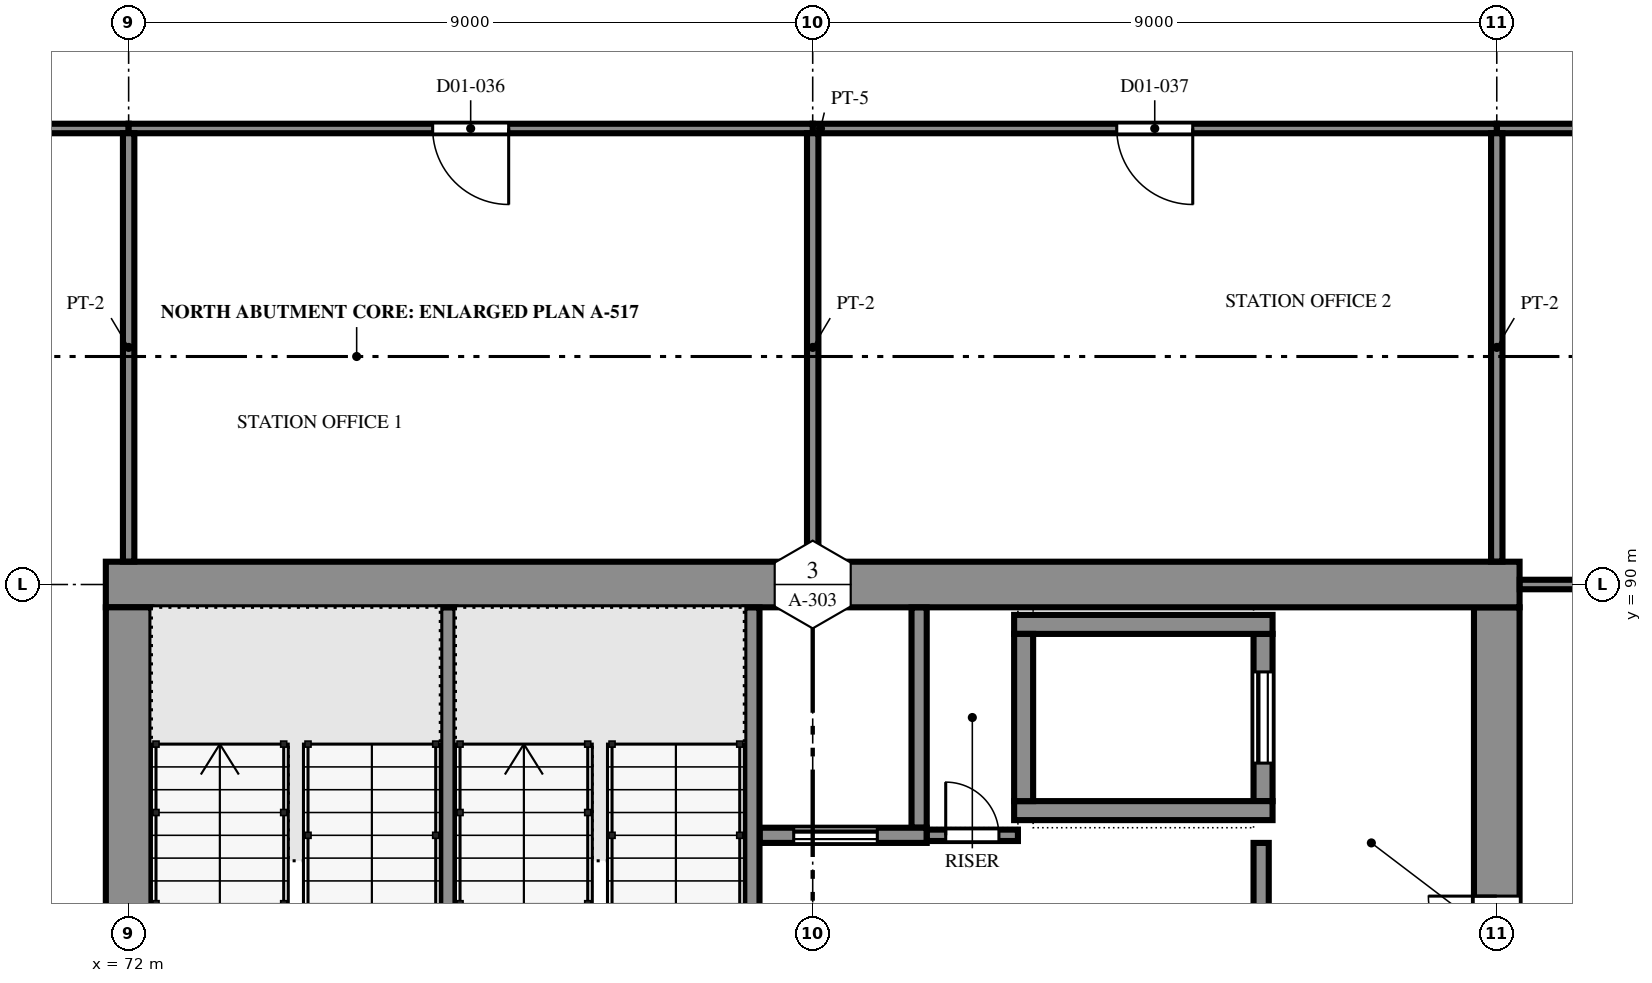
"""IFC4 building model, lengths in metres.
Left out: names, types, materials, properties, quantities, classifications, styles, units other than length and angle.
Written with IfcOpenShell. Run it as: python <this file> out.ifc"""

import sys

from ifc_helpers import new_model, si_unit, direction, frame, frame_2d, origin, place, context, subcontext, project, spatial, polyline, rectangle, outline, extrude, element, fill, save


model = new_model("IFC4")
c1 = context("Model", 3, precision=1e-05, world=origin(), true_north=direction((0.0, 1.0)))
c2 = subcontext(c1, "Body", "Model", "MODEL_VIEW")
j1 = project(units=[si_unit("LENGTHUNIT", "METRE"), si_unit("PLANEANGLEUNIT", "RADIAN")], contexts=[c1])
p1 = place(None, origin())
s1 = spatial("IfcSite", under=j1, at=p1, CompositionType="ELEMENT")
p2 = place(p1, origin())
s2 = spatial("IfcBuilding", under=s1, at=p2, CompositionType="ELEMENT")
p3 = place(p2, frame((0.0, 0.0, 7.5)))
s3 = spatial("IfcBuildingStorey", under=s2, at=p3, CompositionType="ELEMENT", Elevation=7.5)
p4 = place(p3, frame((71.7, 90.0, 0.0), z_axis=(0.0, 0.0, 1.0), x_axis=(1.0, 0.0, 0.0)))
e1 = element("IfcWall", 1, at=p4, inside=s3, PredefinedType="SOLIDWALL", context=c2, shape_type="SweptSolid", body=[
    extrude(rectangle(XDim=18.6, YDim=0.6, at=frame_2d((9.3, 0.0))), origin(), (0.0, 0.0, 1.0), 4.2),
])
p5 = place(p3, frame((72.0, 81.3, 0.0), z_axis=(0.0, 0.0, 1.0), x_axis=(0.0, 1.0, 0.0)))
e2 = element("IfcWall", 2, at=p5, inside=s3, PredefinedType="SOLIDWALL", context=c2, shape_type="SweptSolid", body=[
    extrude(rectangle(XDim=8.4, YDim=0.6, at=frame_2d((4.2, 0.0))), origin(), (0.0, 0.0, 1.0), 4.2),
])
p6 = place(p3, frame((90.0, 81.3, 0.0), z_axis=(0.0, 0.0, 1.0), x_axis=(0.0, 1.0, 0.0)))
e3 = element("IfcWall", 3, at=p6, inside=s3, PredefinedType="SOLIDWALL", context=c2, shape_type="SweptSolid", body=[
    extrude(rectangle(XDim=8.4, YDim=0.6, at=frame_2d((4.2, 0.0))), origin(), (0.0, 0.0, 1.0), 4.2),
])
p7 = place(p6, frame((2.8, 0.0, 0.0)))
e4 = element("IfcOpeningElement", 4, at=p7, cuts=e3, PredefinedType="OPENING", context=c2, shape_type="SweptSolid", body=[
    extrude(rectangle(XDim=1.8, YDim=2.1, at=frame_2d((0.9, 1.05))), frame((0.0, 0.31, 0.0), z_axis=(0.0, -1.0, 0.0), x_axis=(1.0, 0.0, 0.0)), (0.0, 0.0, 1.0), 0.62),
])
p8 = place(p6, frame((0.55, 0.0, 0.0)))
e5 = element("IfcOpeningElement", 5, at=p8, cuts=e3, PredefinedType="OPENING", context=c2, shape_type="SweptSolid", body=[
    extrude(rectangle(XDim=0.9, YDim=2.1, at=frame_2d((0.45, 1.05))), frame((0.0, 0.31, 0.0), z_axis=(0.0, -1.0, 0.0), x_axis=(1.0, 0.0, 0.0)), (0.0, 0.0, 1.0), 0.62),
])
for number, where, z_axis, x_axis in (
    (6, (76.2, 81.302, -0.13), (0.0, 0.0, 1.0), (0.0, 1.0, 0.0)),
    (7, (80.2, 81.302, -0.13), (0.0, 0.0, 1.0), (0.0, 1.0, 0.0)),
):
    element("IfcWall", number, at=place(p3, frame(where, z_axis=z_axis, x_axis=x_axis)), inside=s3, PredefinedType="SOLIDWALL", context=c2, shape_type="SweptSolid", body=[
        extrude(rectangle(XDim=8.396, YDim=0.2, at=frame_2d((4.198, 0.0))), origin(), (0.0, 0.0, 1.0), 3.646),
    ])
p9 = place(p3, frame((80.302, 86.7, 0.0), z_axis=(0.0, 0.0, 1.0), x_axis=(1.0, 0.0, 0.0)))
e8 = element("IfcWall", 8, at=p9, inside=s3, PredefinedType="SOLIDWALL", context=c2, shape_type="SweptSolid", body=[
    extrude(rectangle(XDim=2.198, YDim=0.2, at=frame_2d((1.099, 0.0))), origin(), (0.0, 0.0, 1.0), 3.516),
])
p10 = place(p9, frame((0.448, 0.0, 0.0)))
e9 = element("IfcOpeningElement", 9, at=p10, cuts=e8, PredefinedType="OPENING", context=c2, shape_type="SweptSolid", body=[
    extrude(rectangle(XDim=1.1, YDim=2.1, at=frame_2d((0.55, 1.05))), frame((0.0, 0.11, 0.0), z_axis=(0.0, -1.0, 0.0), x_axis=(1.0, 0.0, 0.0)), (0.0, 0.0, 1.0), 0.22),
])
p11 = place(p3, frame((82.4, 86.8, 0.0), z_axis=(0.0, 0.0, 1.0), x_axis=(0.0, 1.0, 0.0)))
e10 = element("IfcWall", 10, at=p11, inside=s3, PredefinedType="SOLIDWALL", context=c2, shape_type="SweptSolid", body=[
    extrude(rectangle(XDim=2.898, YDim=0.2, at=frame_2d((1.449, 0.0))), origin(), (0.0, 0.0, 1.0), 3.516),
])
for number, where, z_axis, x_axis in (
    (11, (83.65, 87.025, 0.0), (0.0, 0.0, 1.0), (1.0, 0.0, 0.0)),
    (12, (83.65, 89.475, 0.0), (0.0, 0.0, 1.0), (1.0, 0.0, 0.0)),
):
    element("IfcWall", number, at=place(p3, frame(where, z_axis=z_axis, x_axis=x_axis)), inside=s3, PredefinedType="SOLIDWALL", context=c2, shape_type="SweptSolid", body=[
        extrude(rectangle(XDim=3.4, YDim=0.25, at=frame_2d((1.7, 0.0))), origin(), (0.0, 0.0, 1.0), 3.516),
    ])
p12 = place(p3, frame((83.775, 87.15, 0.0), z_axis=(0.0, 0.0, 1.0), x_axis=(0.0, 1.0, 0.0)))
e13 = element("IfcWall", 13, at=p12, inside=s3, PredefinedType="SOLIDWALL", context=c2, shape_type="SweptSolid", body=[
    extrude(rectangle(XDim=2.2, YDim=0.25, at=frame_2d((1.1, 0.0))), origin(), (0.0, 0.0, 1.0), 3.516),
])
p13 = place(p3, frame((86.925, 87.15, 0.0), z_axis=(0.0, 0.0, 1.0), x_axis=(0.0, 1.0, 0.0)))
e14 = element("IfcWall", 14, at=p13, inside=s3, PredefinedType="SOLIDWALL", context=c2, shape_type="SweptSolid", body=[
    extrude(rectangle(XDim=2.2, YDim=0.25, at=frame_2d((1.1, 0.0))), origin(), (0.0, 0.0, 1.0), 3.516),
])
p14 = place(p13, frame((0.5, 0.0, 0.0)))
e15 = element("IfcOpeningElement", 15, at=p14, cuts=e14, PredefinedType="OPENING", context=c2, shape_type="SweptSolid", body=[
    extrude(rectangle(XDim=1.2, YDim=2.1, at=frame_2d((0.6, 1.05))), frame((0.0, 0.135, 0.0), z_axis=(0.0, -1.0, 0.0), x_axis=(1.0, 0.0, 0.0)), (0.0, 0.0, 1.0), 0.27),
])
p15 = place(p3, frame((99.062, 96.0, 0.0), z_axis=(0.0, 0.0, 1.0), x_axis=(-1.0, 0.0, 0.0)))
e16 = element("IfcWall", 16, at=p15, inside=s3, PredefinedType="PARTITIONING", context=c2, shape_type="SweptSolid", body=[
    extrude(rectangle(XDim=9.062, YDim=0.125, at=frame_2d((4.531, 0.0))), origin(), (0.0, 0.0, 1.0), 3.307),
])
p16 = place(p3, frame((72.0, 96.0, 0.0), z_axis=(0.0, 0.0, 1.0), x_axis=(-1.0, 0.0, 0.0)))
e17 = element("IfcWall", 17, at=p16, inside=s3, PredefinedType="PARTITIONING", context=c2, shape_type="SweptSolid", body=[
    extrude(rectangle(XDim=8.858, YDim=0.125, at=frame_2d((4.429, 0.0))), origin(), (0.0, 0.0, 1.0), 3.307),
])
p17 = place(p16, frame((4.0, 0.0, 0.0)))
e18 = element("IfcOpeningElement", 18, at=p17, cuts=e17, PredefinedType="OPENING", context=c2, shape_type="SweptSolid", body=[
    extrude(rectangle(XDim=1.0, YDim=2.1, at=frame_2d((0.5, 1.05))), frame((0.0, 0.073, 0.0), z_axis=(0.0, -1.0, 0.0), x_axis=(1.0, 0.0, 0.0)), (0.0, 0.0, 1.0), 0.145),
])
p18 = place(p3, frame((90.0, 96.0, 0.0), z_axis=(0.0, 0.0, 1.0), x_axis=(-1.0, 0.0, 0.0)))
e19 = element("IfcWall", 19, at=p18, inside=s3, PredefinedType="PARTITIONING", context=c2, shape_type="SweptSolid", body=[
    extrude(rectangle(XDim=9.0, YDim=0.125, at=frame_2d((4.5, 0.0))), origin(), (0.0, 0.0, 1.0), 3.307),
])
p19 = place(p18, frame((4.0, 0.0, 0.0)))
e20 = element("IfcOpeningElement", 20, at=p19, cuts=e19, PredefinedType="OPENING", context=c2, shape_type="SweptSolid", body=[
    extrude(rectangle(XDim=1.0, YDim=2.1, at=frame_2d((0.5, 1.05))), frame((0.0, 0.073, 0.0), z_axis=(0.0, -1.0, 0.0), x_axis=(1.0, 0.0, 0.0)), (0.0, 0.0, 1.0), 0.145),
])
p20 = place(p3, frame((81.0, 96.0, 0.0), z_axis=(0.0, 0.0, 1.0), x_axis=(-1.0, 0.0, 0.0)))
e21 = element("IfcWall", 21, at=p20, inside=s3, PredefinedType="PARTITIONING", context=c2, shape_type="SweptSolid", body=[
    extrude(rectangle(XDim=9.0, YDim=0.125, at=frame_2d((4.5, 0.0))), origin(), (0.0, 0.0, 1.0), 3.307),
])
p21 = place(p20, frame((4.0, 0.0, 0.0)))
e22 = element("IfcOpeningElement", 22, at=p21, cuts=e21, PredefinedType="OPENING", context=c2, shape_type="SweptSolid", body=[
    extrude(rectangle(XDim=1.0, YDim=2.1, at=frame_2d((0.5, 1.05))), frame((0.0, 0.073, 0.0), z_axis=(0.0, -1.0, 0.0), x_axis=(1.0, 0.0, 0.0)), (0.0, 0.0, 1.0), 0.145),
])
p22 = place(p3, frame((90.302, 90.0, 0.0), z_axis=(0.0, 0.0, 1.0), x_axis=(1.0, 0.0, 0.0)))
e23 = element("IfcWall", 23, at=p22, inside=s3, PredefinedType="PARTITIONING", context=c2, shape_type="SweptSolid", body=[
    extrude(rectangle(XDim=8.544, YDim=0.125, at=frame_2d((4.272, 0.0))), origin(), (0.0, 0.0, 1.0), 3.307),
])
p23 = place(p22, frame((3.598, 0.0, 0.0)))
e24 = element("IfcOpeningElement", 24, at=p23, cuts=e23, PredefinedType="OPENING", context=c2, shape_type="SweptSolid", body=[
    extrude(rectangle(XDim=1.2, YDim=2.1, at=frame_2d((0.6, 1.05))), frame((0.0, 0.073, 0.0), z_axis=(0.0, -1.0, 0.0), x_axis=(1.0, 0.0, 0.0)), (0.0, 0.0, 1.0), 0.145),
])
for number, where, z_axis, x_axis in (
    (25, (72.0, 95.938, 0.0), (0.0, 0.0, 1.0), (0.0, -1.0, 0.0)),
    (26, (81.0, 95.938, 0.0), (0.0, 0.0, 1.0), (0.0, -1.0, 0.0)),
    (27, (90.0, 95.938, 0.0), (0.0, 0.0, 1.0), (0.0, -1.0, 0.0)),
):
    element("IfcWall", number, at=place(p3, frame(where, z_axis=z_axis, x_axis=x_axis)), inside=s3, PredefinedType="PARTITIONING", context=c2, shape_type="SweptSolid", body=[
        extrude(rectangle(XDim=5.635, YDim=0.15, at=frame_2d((2.818, 0.0))), origin(), (0.0, 0.0, 1.0), 3.307),
    ])
p24 = place(p3, frame((86.9, 86.6, 0.0), z_axis=(0.0, 0.0, 1.0), x_axis=(0.0, -1.0, 0.0)))
e28 = element("IfcWall", 28, at=p24, inside=s3, PredefinedType="PARTITIONING", context=c2, shape_type="SweptSolid", body=[
    extrude(rectangle(XDim=3.1, YDim=0.2, at=frame_2d((1.55, 0.0))), origin(), (0.0, 0.0, 1.0), 3.382),
])
p25 = place(p24, frame((1.0, 0.0, 0.0)))
e29 = element("IfcOpeningElement", 29, at=p25, cuts=e28, PredefinedType="OPENING", context=c2, shape_type="SweptSolid", body=[
    extrude(rectangle(XDim=1.2, YDim=2.1, at=frame_2d((0.6, 1.05))), frame((0.0, 0.11, 0.0), z_axis=(0.0, -1.0, 0.0), x_axis=(1.0, 0.0, 0.0)), (0.0, 0.0, 1.0), 0.22),
])
p26 = place(p3, frame((82.502, 86.7, 0.0), z_axis=(0.0, 0.0, 1.0), x_axis=(1.0, 0.0, 0.0)))
e30 = element("IfcWall", 30, at=p26, inside=s3, PredefinedType="SOLIDWALL", context=c2, shape_type="SweptSolid", body=[
    extrude(rectangle(XDim=1.198, YDim=0.15, at=frame_2d((0.599, 0.0))), origin(), (0.0, 0.0, 1.0), 3.516),
])
p27 = place(p26, frame((0.248, 0.0, 0.0)))
e31 = element("IfcOpeningElement", 31, at=p27, cuts=e30, PredefinedType="OPENING", context=c2, shape_type="SweptSolid", body=[
    extrude(rectangle(XDim=0.7, YDim=2.0, at=frame_2d((0.35, 1.0))), frame((0.0, 0.085, 0.0), z_axis=(0.0, -1.0, 0.0), x_axis=(1.0, 0.0, 0.0)), (0.0, 0.0, 1.0), 0.17),
])
p28 = place(p10, origin())
e32 = element("IfcDoor", 32, at=p28, inside=s3, OperationType="SLIDING_TO_LEFT", PredefinedType="DOOR", context=c2, shape_type="SweptSolid", body=[
    extrude(outline(polyline([(0.0, 0.0), (0.07, 0.0), (0.07, 2.03), (1.03, 2.03), (1.03, 0.0), (1.1, 0.0), (1.1, 2.1), (0.0, 2.1), (0.0, 0.0)])), frame((0.0, 0.025, 0.0), z_axis=(0.0, -1.0, 0.0), x_axis=(1.0, 0.0, 0.0)), (0.0, 0.0, 1.0), 0.05),
    extrude(rectangle(XDim=0.524, YDim=2.016, at=frame_2d((0.336, 1.018))), frame((0.0, 0.018, 0.0), z_axis=(0.0, -1.0, 0.0), x_axis=(1.0, 0.0, 0.0)), (0.0, 0.0, 1.0), 0.016),
    extrude(rectangle(XDim=0.52, YDim=2.016, at=frame_2d((0.766, 1.018))), frame((0.0, -0.002, 0.0), z_axis=(0.0, -1.0, 0.0), x_axis=(1.0, 0.0, 0.0)), (0.0, 0.0, 1.0), 0.016),
])
fill(e9, e32)
p29 = place(p14, origin())
e33 = element("IfcDoor", 33, at=p29, inside=s3, OperationType="SLIDING_TO_LEFT", PredefinedType="DOOR", context=c2, shape_type="SweptSolid", body=[
    extrude(outline(polyline([(0.0, 0.0), (0.07, 0.0), (0.07, 2.03), (1.13, 2.03), (1.13, 0.0), (1.2, 0.0), (1.2, 2.1), (0.0, 2.1), (0.0, 0.0)])), frame((0.0, 0.025, 0.0), z_axis=(0.0, -1.0, 0.0), x_axis=(1.0, 0.0, 0.0)), (0.0, 0.0, 1.0), 0.05),
    extrude(rectangle(XDim=0.579, YDim=2.016, at=frame_2d((0.363, 1.018))), frame((0.0, 0.018, 0.0), z_axis=(0.0, -1.0, 0.0), x_axis=(1.0, 0.0, 0.0)), (0.0, 0.0, 1.0), 0.016),
    extrude(rectangle(XDim=0.575, YDim=2.016, at=frame_2d((0.839, 1.018))), frame((0.0, -0.002, 0.0), z_axis=(0.0, -1.0, 0.0), x_axis=(1.0, 0.0, 0.0)), (0.0, 0.0, 1.0), 0.016),
])
fill(e15, e33)
p30 = place(p21, origin())
e34 = element("IfcDoor", 34, at=p30, inside=s3, OperationType="SINGLE_SWING_LEFT", PredefinedType="DOOR", context=c2, shape_type="SweptSolid", body=[
    extrude(outline(polyline([(0.0, 0.0), (0.07, 0.0), (0.07, 2.03), (0.93, 2.03), (0.93, 0.0), (1.0, 0.0), (1.0, 2.1), (0.0, 2.1), (0.0, 0.0)])), frame((0.0, 0.025, 0.0), z_axis=(0.0, -1.0, 0.0), x_axis=(1.0, 0.0, 0.0)), (0.0, 0.0, 1.0), 0.05),
    extrude(outline(polyline([(0.074, 0.01), (0.926, 0.01), (0.926, 2.026), (0.074, 2.026), (0.074, 0.01)]), holes=[polyline([(0.194, 0.16), (0.806, 0.16), (0.806, 1.01), (0.194, 1.01), (0.194, 0.16)]), polyline([(0.35, 1.16), (0.65, 1.16), (0.65, 1.76), (0.35, 1.76), (0.35, 1.16)])]), frame((0.0, 0.017, 0.0), z_axis=(0.0, -1.0, 0.0), x_axis=(1.0, 0.0, 0.0)), (0.0, 0.0, 1.0), 0.035),
    extrude(rectangle(XDim=0.612, YDim=0.85, at=frame_2d((0.5, 0.585))), frame((0.0, 0.009, 0.0), z_axis=(0.0, -1.0, 0.0), x_axis=(1.0, 0.0, 0.0)), (0.0, 0.0, 1.0), 0.017),
    extrude(rectangle(XDim=0.3, YDim=0.6, at=frame_2d((0.5, 1.46))), frame((0.0, 0.006, 0.0), z_axis=(0.0, -1.0, 0.0), x_axis=(1.0, 0.0, 0.0)), (0.0, 0.0, 1.0), 0.012),
])
fill(e22, e34)
p31 = place(p19, origin())
e35 = element("IfcDoor", 35, at=p31, inside=s3, OperationType="SINGLE_SWING_LEFT", PredefinedType="DOOR", context=c2, shape_type="SweptSolid", body=[
    extrude(outline(polyline([(0.0, 0.0), (0.07, 0.0), (0.07, 2.03), (0.93, 2.03), (0.93, 0.0), (1.0, 0.0), (1.0, 2.1), (0.0, 2.1), (0.0, 0.0)])), frame((0.0, 0.025, 0.0), z_axis=(0.0, -1.0, 0.0), x_axis=(1.0, 0.0, 0.0)), (0.0, 0.0, 1.0), 0.05),
    extrude(outline(polyline([(0.074, 0.01), (0.926, 0.01), (0.926, 2.026), (0.074, 2.026), (0.074, 0.01)]), holes=[polyline([(0.194, 0.16), (0.806, 0.16), (0.806, 1.01), (0.194, 1.01), (0.194, 0.16)]), polyline([(0.35, 1.16), (0.65, 1.16), (0.65, 1.76), (0.35, 1.76), (0.35, 1.16)])]), frame((0.0, 0.017, 0.0), z_axis=(0.0, -1.0, 0.0), x_axis=(1.0, 0.0, 0.0)), (0.0, 0.0, 1.0), 0.035),
    extrude(rectangle(XDim=0.612, YDim=0.85, at=frame_2d((0.5, 0.585))), frame((0.0, 0.009, 0.0), z_axis=(0.0, -1.0, 0.0), x_axis=(1.0, 0.0, 0.0)), (0.0, 0.0, 1.0), 0.017),
    extrude(rectangle(XDim=0.3, YDim=0.6, at=frame_2d((0.5, 1.46))), frame((0.0, 0.006, 0.0), z_axis=(0.0, -1.0, 0.0), x_axis=(1.0, 0.0, 0.0)), (0.0, 0.0, 1.0), 0.012),
])
fill(e20, e35)
p32 = place(p7, origin())
e36 = element("IfcDoor", 36, at=p32, inside=s3, OperationType="DOUBLE_DOOR_SINGLE_SWING", PredefinedType="DOOR", context=c2, shape_type="SweptSolid", body=[
    extrude(outline(polyline([(0.0, 0.0), (0.07, 0.0), (0.07, 2.03), (1.73, 2.03), (1.73, 0.0), (1.8, 0.0), (1.8, 2.1), (0.0, 2.1), (0.0, 0.0)])), frame((0.0, 0.025, 0.0), z_axis=(0.0, -1.0, 0.0), x_axis=(1.0, 0.0, 0.0)), (0.0, 0.0, 1.0), 0.05),
    extrude(outline(polyline([(0.074, 0.01), (0.897, 0.01), (0.897, 2.026), (0.074, 2.026), (0.074, 0.01)]), holes=[polyline([(0.194, 0.16), (0.777, 0.16), (0.777, 1.01), (0.194, 1.01), (0.194, 0.16)]), polyline([(0.335, 1.16), (0.635, 1.16), (0.635, 1.76), (0.335, 1.76), (0.335, 1.16)])]), frame((0.0, 0.017, 0.0), z_axis=(0.0, -1.0, 0.0), x_axis=(1.0, 0.0, 0.0)), (0.0, 0.0, 1.0), 0.035),
    extrude(rectangle(XDim=0.583, YDim=0.85, at=frame_2d((0.485, 0.585))), frame((0.0, 0.009, 0.0), z_axis=(0.0, -1.0, 0.0), x_axis=(1.0, 0.0, 0.0)), (0.0, 0.0, 1.0), 0.017),
    extrude(rectangle(XDim=0.3, YDim=0.6, at=frame_2d((0.485, 1.46))), frame((0.0, 0.006, 0.0), z_axis=(0.0, -1.0, 0.0), x_axis=(1.0, 0.0, 0.0)), (0.0, 0.0, 1.0), 0.012),
    extrude(outline(polyline([(0.903, 0.01), (1.726, 0.01), (1.726, 2.026), (0.903, 2.026), (0.903, 0.01)]), holes=[polyline([(1.023, 0.16), (1.606, 0.16), (1.606, 1.01), (1.023, 1.01), (1.023, 0.16)]), polyline([(1.165, 1.16), (1.465, 1.16), (1.465, 1.76), (1.165, 1.76), (1.165, 1.16)])]), frame((0.0, 0.017, 0.0), z_axis=(0.0, -1.0, 0.0), x_axis=(1.0, 0.0, 0.0)), (0.0, 0.0, 1.0), 0.035),
    extrude(rectangle(XDim=0.583, YDim=0.85, at=frame_2d((1.314, 0.585))), frame((0.0, 0.009, 0.0), z_axis=(0.0, -1.0, 0.0), x_axis=(1.0, 0.0, 0.0)), (0.0, 0.0, 1.0), 0.017),
    extrude(rectangle(XDim=0.3, YDim=0.6, at=frame_2d((1.314, 1.46))), frame((0.0, 0.006, 0.0), z_axis=(0.0, -1.0, 0.0), x_axis=(1.0, 0.0, 0.0)), (0.0, 0.0, 1.0), 0.012),
])
fill(e4, e36)
p33 = place(p27, origin())
e37 = element("IfcDoor", 37, at=p33, inside=s3, OperationType="SINGLE_SWING_LEFT", PredefinedType="DOOR", context=c2, shape_type="SweptSolid", body=[
    extrude(outline(polyline([(0.0, 0.0), (0.07, 0.0), (0.07, 1.93), (0.63, 1.93), (0.63, 0.0), (0.7, 0.0), (0.7, 2.0), (0.0, 2.0), (0.0, 0.0)])), frame((0.0, 0.025, 0.0), z_axis=(0.0, -1.0, 0.0), x_axis=(1.0, 0.0, 0.0)), (0.0, 0.0, 1.0), 0.05),
    extrude(outline(polyline([(0.074, 0.01), (0.626, 0.01), (0.626, 1.926), (0.074, 1.926), (0.074, 0.01)]), holes=[polyline([(0.184, 0.16), (0.516, 0.16), (0.516, 1.01), (0.184, 1.01), (0.184, 0.16)]), polyline([(0.2, 1.16), (0.5, 1.16), (0.5, 1.76), (0.2, 1.76), (0.2, 1.16)])]), frame((0.0, 0.017, 0.0), z_axis=(0.0, -1.0, 0.0), x_axis=(1.0, 0.0, 0.0)), (0.0, 0.0, 1.0), 0.035),
    extrude(rectangle(XDim=0.331, YDim=0.85, at=frame_2d((0.35, 0.585))), frame((0.0, 0.009, 0.0), z_axis=(0.0, -1.0, 0.0), x_axis=(1.0, 0.0, 0.0)), (0.0, 0.0, 1.0), 0.017),
    extrude(rectangle(XDim=0.3, YDim=0.6, at=frame_2d((0.35, 1.46))), frame((0.0, 0.006, 0.0), z_axis=(0.0, -1.0, 0.0), x_axis=(1.0, 0.0, 0.0)), (0.0, 0.0, 1.0), 0.012),
])
fill(e31, e37)
save(model, sys.argv[1])
